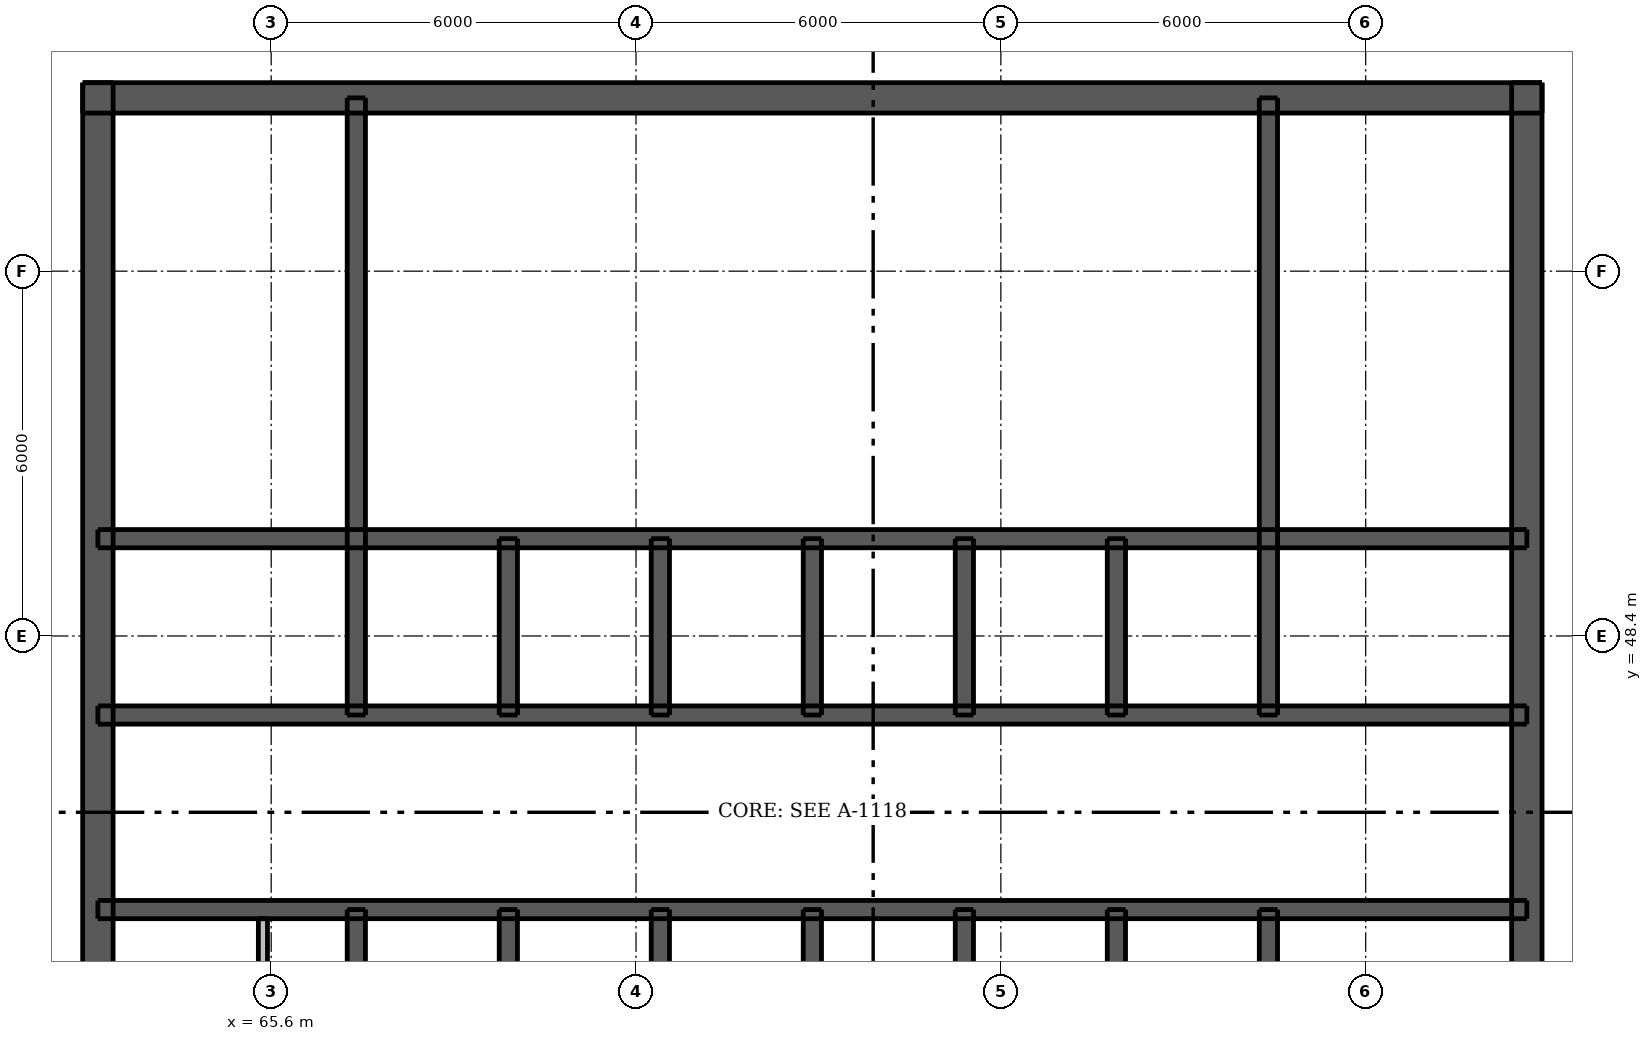
"""IFC4 building model, lengths in metres.
Left out: names, types, materials, properties, quantities, classifications, styles, units other than length and angle.
Written with IfcOpenShell. Run it as: python <this file> out.ifc"""

import sys

from ifc_helpers import new_model, si_unit, direction, frame, frame_2d, origin, place, context, subcontext, project, spatial, rectangle, extrude, element, fill, save


model = new_model("IFC4")
c1 = context("Model", 3, precision=1e-05, world=origin(), true_north=direction((0.0, 1.0)))
c2 = subcontext(c1, "Body", "Model", "MODEL_VIEW")
j1 = project(units=[si_unit("LENGTHUNIT", "METRE"), si_unit("PLANEANGLEUNIT", "RADIAN")], contexts=[c1])
p1 = place(None, origin())
s1 = spatial("IfcSite", under=j1, at=p1, CompositionType="ELEMENT")
p2 = place(p1, origin())
s2 = spatial("IfcBuilding", under=s1, at=p2, CompositionType="ELEMENT")
p3 = place(p2, frame((0.0, 0.0, 262.0)))
s3 = spatial("IfcBuildingStorey", under=s2, at=p3, CompositionType="ELEMENT", Elevation=262.0)
p4 = place(p3, frame((62.5, 57.25, 0.0), z_axis=(0.0, 0.0, 1.0), x_axis=(1.0, 0.0, 0.0)))
e1 = element("IfcWall", 1, at=p4, inside=s3, PredefinedType="SHEAR", context=c2, shape_type="SweptSolid", body=[
    extrude(rectangle(XDim=24.0, YDim=0.5, at=frame_2d((12.0, 0.0))), origin(), (0.0, 0.0, 1.0), 3.05),
])
p5 = place(p4, frame((21.025, 0.0, 0.0)))
e2 = element("IfcOpeningElement", 2, at=p5, cuts=e1, PredefinedType="OPENING", context=c2, shape_type="SweptSolid", body=[
    extrude(rectangle(XDim=1.1, YDim=2.1, at=frame_2d((0.55, 1.05))), frame((0.0, 0.26, 0.0), z_axis=(0.0, -1.0, 0.0), x_axis=(1.0, 0.0, 0.0)), (0.0, 0.0, 1.0), 0.52),
])
p6 = place(p4, frame((1.875, 0.0, 0.0)))
e3 = element("IfcOpeningElement", 3, at=p6, cuts=e1, PredefinedType="OPENING", context=c2, shape_type="SweptSolid", body=[
    extrude(rectangle(XDim=1.1, YDim=2.1, at=frame_2d((0.55, 1.05))), frame((0.0, 0.26, 0.0), z_axis=(0.0, -1.0, 0.0), x_axis=(1.0, 0.0, 0.0)), (0.0, 0.0, 1.0), 0.52),
])
p7 = place(p4, frame((11.55, 0.0, 0.0)))
e4 = element("IfcOpeningElement", 4, at=p7, cuts=e1, PredefinedType="OPENING", context=c2, shape_type="SweptSolid", body=[
    extrude(rectangle(XDim=0.9, YDim=2.1, at=frame_2d((0.45, 1.05))), frame((0.0, 0.26, 0.0), z_axis=(0.0, -1.0, 0.0), x_axis=(1.0, 0.0, 0.0)), (0.0, 0.0, 1.0), 0.52),
])
p8 = place(p3, frame((62.75, 33.5, 0.0), z_axis=(0.0, 0.0, 1.0), x_axis=(0.0, 1.0, 0.0)))
e5 = element("IfcWall", 5, at=p8, inside=s3, PredefinedType="SHEAR", context=c2, shape_type="SweptSolid", body=[
    extrude(rectangle(XDim=24.0, YDim=0.5, at=frame_2d((12.0, 0.0))), origin(), (0.0, 0.0, 1.0), 3.05),
])
p9 = place(p8, frame((11.2, 0.0, 0.0)))
e6 = element("IfcOpeningElement", 6, at=p9, cuts=e5, PredefinedType="OPENING", context=c2, shape_type="SweptSolid", body=[
    extrude(rectangle(XDim=1.6, YDim=2.1, at=frame_2d((0.8, 1.05))), frame((0.0, 0.26, 0.0), z_axis=(0.0, -1.0, 0.0), x_axis=(1.0, 0.0, 0.0)), (0.0, 0.0, 1.0), 0.52),
])
p10 = place(p3, frame((86.25, 33.5, 0.0), z_axis=(0.0, 0.0, 1.0), x_axis=(0.0, 1.0, 0.0)))
e7 = element("IfcWall", 7, at=p10, inside=s3, PredefinedType="SHEAR", context=c2, shape_type="SweptSolid", body=[
    extrude(rectangle(XDim=24.0, YDim=0.5, at=frame_2d((12.0, 0.0))), origin(), (0.0, 0.0, 1.0), 3.05),
])
p11 = place(p10, frame((11.2, 0.0, 0.0)))
e8 = element("IfcOpeningElement", 8, at=p11, cuts=e7, PredefinedType="OPENING", context=c2, shape_type="SweptSolid", body=[
    extrude(rectangle(XDim=1.6, YDim=2.1, at=frame_2d((0.8, 1.05))), frame((0.0, 0.26, 0.0), z_axis=(0.0, -1.0, 0.0), x_axis=(1.0, 0.0, 0.0)), (0.0, 0.0, 1.0), 0.52),
])
p12 = place(p3, frame((62.75, 43.9, 0.0), z_axis=(0.0, 0.0, 1.0), x_axis=(1.0, 0.0, 0.0)))
e9 = element("IfcWall", 9, at=p12, inside=s3, PredefinedType="SHEAR", context=c2, shape_type="SweptSolid", body=[
    extrude(rectangle(XDim=23.5, YDim=0.3, at=frame_2d((11.75, 0.0))), origin(), (0.0, 0.0, 1.0), 3.05),
])
p13 = place(p12, frame((1.032, 0.0, 0.0)))
e10 = element("IfcOpeningElement", 10, at=p13, cuts=e9, PredefinedType="OPENING", context=c2, shape_type="SweptSolid", body=[
    extrude(rectangle(XDim=0.9, YDim=2.1, at=frame_2d((0.45, 1.05))), frame((0.0, 0.16, 0.0), z_axis=(0.0, -1.0, 0.0), x_axis=(1.0, 0.0, 0.0)), (0.0, 0.0, 1.0), 0.32),
])
p14 = place(p12, frame((3.007, 0.0, 0.0)))
e11 = element("IfcOpeningElement", 11, at=p14, cuts=e9, PredefinedType="OPENING", context=c2, shape_type="SweptSolid", body=[
    extrude(rectangle(XDim=0.8, YDim=2.1, at=frame_2d((0.4, 1.05))), frame((0.0, 0.16, 0.0), z_axis=(0.0, -1.0, 0.0), x_axis=(1.0, 0.0, 0.0)), (0.0, 0.0, 1.0), 0.32),
])
p15 = place(p12, frame((20.875, 0.0, 0.0)))
e12 = element("IfcOpeningElement", 12, at=p15, cuts=e9, PredefinedType="OPENING", context=c2, shape_type="SweptSolid", body=[
    extrude(rectangle(XDim=0.9, YDim=2.1, at=frame_2d((0.45, 1.05))), frame((0.0, 0.16, 0.0), z_axis=(0.0, -1.0, 0.0), x_axis=(1.0, 0.0, 0.0)), (0.0, 0.0, 1.0), 0.32),
])
p16 = place(p12, frame((5.05, 0.0, 0.0)))
e13 = element("IfcOpeningElement", 13, at=p16, cuts=e9, PredefinedType="OPENING", context=c2, shape_type="SweptSolid", body=[
    extrude(rectangle(XDim=0.9, YDim=2.1, at=frame_2d((0.45, 1.05))), frame((0.0, 0.16, 0.0), z_axis=(0.0, -1.0, 0.0), x_axis=(1.0, 0.0, 0.0)), (0.0, 0.0, 1.0), 0.32),
])
p17 = place(p12, frame((10.05, 0.0, 0.0)))
e14 = element("IfcOpeningElement", 14, at=p17, cuts=e9, PredefinedType="OPENING", context=c2, shape_type="SweptSolid", body=[
    extrude(rectangle(XDim=0.9, YDim=2.1, at=frame_2d((0.45, 1.05))), frame((0.0, 0.16, 0.0), z_axis=(0.0, -1.0, 0.0), x_axis=(1.0, 0.0, 0.0)), (0.0, 0.0, 1.0), 0.32),
])
p18 = place(p12, frame((12.55, 0.0, 0.0)))
e15 = element("IfcOpeningElement", 15, at=p18, cuts=e9, PredefinedType="OPENING", context=c2, shape_type="SweptSolid", body=[
    extrude(rectangle(XDim=0.9, YDim=2.1, at=frame_2d((0.45, 1.05))), frame((0.0, 0.16, 0.0), z_axis=(0.0, -1.0, 0.0), x_axis=(1.0, 0.0, 0.0)), (0.0, 0.0, 1.0), 0.32),
])
p19 = place(p12, frame((17.55, 0.0, 0.0)))
e16 = element("IfcOpeningElement", 16, at=p19, cuts=e9, PredefinedType="OPENING", context=c2, shape_type="SweptSolid", body=[
    extrude(rectangle(XDim=0.9, YDim=2.1, at=frame_2d((0.45, 1.05))), frame((0.0, 0.16, 0.0), z_axis=(0.0, -1.0, 0.0), x_axis=(1.0, 0.0, 0.0)), (0.0, 0.0, 1.0), 0.32),
])
p20 = place(p3, frame((62.75, 47.1, 0.0), z_axis=(0.0, 0.0, 1.0), x_axis=(1.0, 0.0, 0.0)))
e17 = element("IfcWall", 17, at=p20, inside=s3, PredefinedType="SHEAR", context=c2, shape_type="SweptSolid", body=[
    extrude(rectangle(XDim=23.5, YDim=0.3, at=frame_2d((11.75, 0.0))), origin(), (0.0, 0.0, 1.0), 3.05),
])
p21 = place(p20, frame((1.725, 0.0, 0.0)))
e18 = element("IfcOpeningElement", 18, at=p21, cuts=e17, PredefinedType="OPENING", context=c2, shape_type="SweptSolid", body=[
    extrude(rectangle(XDim=0.9, YDim=2.1, at=frame_2d((0.45, 1.05))), frame((0.0, 0.16, 0.0), z_axis=(0.0, -1.0, 0.0), x_axis=(1.0, 0.0, 0.0)), (0.0, 0.0, 1.0), 0.32),
])
p22 = place(p20, frame((20.875, 0.0, 0.0)))
e19 = element("IfcOpeningElement", 19, at=p22, cuts=e17, PredefinedType="OPENING", context=c2, shape_type="SweptSolid", body=[
    extrude(rectangle(XDim=0.9, YDim=2.1, at=frame_2d((0.45, 1.05))), frame((0.0, 0.16, 0.0), z_axis=(0.0, -1.0, 0.0), x_axis=(1.0, 0.0, 0.0)), (0.0, 0.0, 1.0), 0.32),
])
p23 = place(p20, frame((4.95, 0.0, 0.0)))
e20 = element("IfcOpeningElement", 20, at=p23, cuts=e17, PredefinedType="OPENING", context=c2, shape_type="SweptSolid", body=[
    extrude(rectangle(XDim=1.1, YDim=2.1, at=frame_2d((0.55, 1.05))), frame((0.0, 0.16, 0.0), z_axis=(0.0, -1.0, 0.0), x_axis=(1.0, 0.0, 0.0)), (0.0, 0.0, 1.0), 0.32),
])
p24 = place(p20, frame((7.45, 0.0, 0.0)))
e21 = element("IfcOpeningElement", 21, at=p24, cuts=e17, PredefinedType="OPENING", context=c2, shape_type="SweptSolid", body=[
    extrude(rectangle(XDim=1.1, YDim=2.1, at=frame_2d((0.55, 1.05))), frame((0.0, 0.16, 0.0), z_axis=(0.0, -1.0, 0.0), x_axis=(1.0, 0.0, 0.0)), (0.0, 0.0, 1.0), 0.32),
])
p25 = place(p20, frame((9.95, 0.0, 0.0)))
e22 = element("IfcOpeningElement", 22, at=p25, cuts=e17, PredefinedType="OPENING", context=c2, shape_type="SweptSolid", body=[
    extrude(rectangle(XDim=1.1, YDim=2.1, at=frame_2d((0.55, 1.05))), frame((0.0, 0.16, 0.0), z_axis=(0.0, -1.0, 0.0), x_axis=(1.0, 0.0, 0.0)), (0.0, 0.0, 1.0), 0.32),
])
p26 = place(p20, frame((12.45, 0.0, 0.0)))
e23 = element("IfcOpeningElement", 23, at=p26, cuts=e17, PredefinedType="OPENING", context=c2, shape_type="SweptSolid", body=[
    extrude(rectangle(XDim=1.1, YDim=2.1, at=frame_2d((0.55, 1.05))), frame((0.0, 0.16, 0.0), z_axis=(0.0, -1.0, 0.0), x_axis=(1.0, 0.0, 0.0)), (0.0, 0.0, 1.0), 0.32),
])
p27 = place(p20, frame((14.95, 0.0, 0.0)))
e24 = element("IfcOpeningElement", 24, at=p27, cuts=e17, PredefinedType="OPENING", context=c2, shape_type="SweptSolid", body=[
    extrude(rectangle(XDim=1.1, YDim=2.1, at=frame_2d((0.55, 1.05))), frame((0.0, 0.16, 0.0), z_axis=(0.0, -1.0, 0.0), x_axis=(1.0, 0.0, 0.0)), (0.0, 0.0, 1.0), 0.32),
])
p28 = place(p20, frame((17.45, 0.0, 0.0)))
e25 = element("IfcOpeningElement", 25, at=p28, cuts=e17, PredefinedType="OPENING", context=c2, shape_type="SweptSolid", body=[
    extrude(rectangle(XDim=1.1, YDim=2.1, at=frame_2d((0.55, 1.05))), frame((0.0, 0.16, 0.0), z_axis=(0.0, -1.0, 0.0), x_axis=(1.0, 0.0, 0.0)), (0.0, 0.0, 1.0), 0.32),
])
p29 = place(p3, frame((62.75, 50.0, 0.0), z_axis=(0.0, 0.0, 1.0), x_axis=(1.0, 0.0, 0.0)))
e26 = element("IfcWall", 26, at=p29, inside=s3, PredefinedType="SHEAR", context=c2, shape_type="SweptSolid", body=[
    extrude(rectangle(XDim=23.5, YDim=0.3, at=frame_2d((11.75, 0.0))), origin(), (0.0, 0.0, 1.0), 3.05),
])
p30 = place(p3, frame((67.0, 33.75, 0.0), z_axis=(0.0, 0.0, 1.0), x_axis=(0.0, 1.0, 0.0)))
e27 = element("IfcWall", 27, at=p30, inside=s3, PredefinedType="SHEAR", context=c2, shape_type="SweptSolid", body=[
    extrude(rectangle(XDim=10.15, YDim=0.3, at=frame_2d((5.075, 0.0))), origin(), (0.0, 0.0, 1.0), 3.05),
])
p31 = place(p30, frame((0.45, 0.0, 0.0)))
e28 = element("IfcOpeningElement", 28, at=p31, cuts=e27, PredefinedType="OPENING", context=c2, shape_type="SweptSolid", body=[
    extrude(rectangle(XDim=1.1, YDim=2.1, at=frame_2d((0.55, 1.05))), frame((0.0, 0.16, 0.0), z_axis=(0.0, -1.0, 0.0), x_axis=(1.0, 0.0, 0.0)), (0.0, 0.0, 1.0), 0.32),
])
for number, where, z_axis, x_axis in (
    (29, (67.0, 47.1, 0.0), (0.0, 0.0, 1.0), (0.0, 1.0, 0.0)),
    (30, (82.0, 33.75, 0.0), (0.0, 0.0, 1.0), (0.0, 1.0, 0.0)),
    (31, (82.0, 47.1, 0.0), (0.0, 0.0, 1.0), (0.0, 1.0, 0.0)),
):
    element("IfcWall", number, at=place(p3, frame(where, z_axis=z_axis, x_axis=x_axis)), inside=s3, PredefinedType="SHEAR", context=c2, shape_type="SweptSolid", body=[
        extrude(rectangle(XDim=10.15, YDim=0.3, at=frame_2d((5.075, 0.0))), origin(), (0.0, 0.0, 1.0), 3.05),
    ])
for number, where, z_axis, x_axis in (
    (32, (69.5, 41.0, 0.0), (0.0, 0.0, 1.0), (0.0, 1.0, 0.0)),
    (33, (69.5, 47.1, 0.0), (0.0, 0.0, 1.0), (0.0, 1.0, 0.0)),
    (34, (72.0, 41.0, 0.0), (0.0, 0.0, 1.0), (0.0, 1.0, 0.0)),
    (35, (72.0, 47.1, 0.0), (0.0, 0.0, 1.0), (0.0, 1.0, 0.0)),
    (36, (74.5, 41.0, 0.0), (0.0, 0.0, 1.0), (0.0, 1.0, 0.0)),
    (37, (74.5, 47.1, 0.0), (0.0, 0.0, 1.0), (0.0, 1.0, 0.0)),
    (38, (77.0, 41.0, 0.0), (0.0, 0.0, 1.0), (0.0, 1.0, 0.0)),
    (39, (77.0, 47.1, 0.0), (0.0, 0.0, 1.0), (0.0, 1.0, 0.0)),
    (40, (79.5, 41.0, 0.0), (0.0, 0.0, 1.0), (0.0, 1.0, 0.0)),
    (41, (79.5, 47.1, 0.0), (0.0, 0.0, 1.0), (0.0, 1.0, 0.0)),
):
    element("IfcWall", number, at=place(p3, frame(where, z_axis=z_axis, x_axis=x_axis)), inside=s3, PredefinedType="SHEAR", context=c2, shape_type="SweptSolid", body=[
        extrude(rectangle(XDim=2.9, YDim=0.3, at=frame_2d((1.45, 0.0))), origin(), (0.0, 0.0, 1.0), 3.05),
    ])
p32 = place(p3, frame((65.464, 41.15, 0.0), z_axis=(0.0, 0.0, 1.0), x_axis=(0.0, 1.0, 0.0)))
e42 = element("IfcWall", 42, at=p32, inside=s3, PredefinedType="PLUMBINGWALL", context=c2, shape_type="SweptSolid", body=[
    extrude(rectangle(XDim=2.6, YDim=0.15, at=frame_2d((1.3, 0.0))), origin(), (0.0, 0.0, 1.0), 3.05),
])
p33 = place(p5, origin())
e43 = element("IfcDoor", 43, at=p33, inside=s3, OperationType="SINGLE_SWING_RIGHT", PredefinedType="DOOR", context=c2, shape_type="SweptSolid", body=[
    extrude(rectangle(XDim=1.1, YDim=2.1, at=frame_2d((0.55, 1.05))), frame((0.0, -0.188, 0.0), z_axis=(0.0, -1.0, 0.0), x_axis=(1.0, 0.0, 0.0)), (0.0, 0.0, 1.0), 0.05),
])
fill(e2, e43)
p34 = place(p6, origin())
e44 = element("IfcDoor", 44, at=p34, inside=s3, OperationType="SINGLE_SWING_LEFT", PredefinedType="DOOR", context=c2, shape_type="SweptSolid", body=[
    extrude(rectangle(XDim=1.1, YDim=2.1, at=frame_2d((0.55, 1.05))), frame((0.0, -0.188, 0.0), z_axis=(0.0, -1.0, 0.0), x_axis=(1.0, 0.0, 0.0)), (0.0, 0.0, 1.0), 0.05),
])
fill(e3, e44)
p35 = place(p9, origin())
e45 = element("IfcDoor", 45, at=p35, inside=s3, OperationType="DOUBLE_DOOR_SINGLE_SWING", PredefinedType="DOOR", context=c2, shape_type="SweptSolid", body=[
    extrude(rectangle(XDim=1.6, YDim=2.1, at=frame_2d((0.8, 1.05))), frame((0.0, -0.188, 0.0), z_axis=(0.0, -1.0, 0.0), x_axis=(1.0, 0.0, 0.0)), (0.0, 0.0, 1.0), 0.05),
])
fill(e6, e45)
p36 = place(p11, origin())
e46 = element("IfcDoor", 46, at=p36, inside=s3, OperationType="DOUBLE_DOOR_SINGLE_SWING", PredefinedType="DOOR", context=c2, shape_type="SweptSolid", body=[
    extrude(rectangle(XDim=1.6, YDim=2.1, at=frame_2d((0.8, 1.05))), frame((0.0, 0.237, 0.0), z_axis=(0.0, -1.0, 0.0), x_axis=(1.0, 0.0, 0.0)), (0.0, 0.0, 1.0), 0.05),
])
fill(e8, e46)
p37 = place(p13, origin())
e47 = element("IfcDoor", 47, at=p37, inside=s3, OperationType="SINGLE_SWING_LEFT", PredefinedType="DOOR", context=c2, shape_type="SweptSolid", body=[
    extrude(rectangle(XDim=0.9, YDim=2.1, at=frame_2d((0.45, 1.05))), frame((0.0, -0.087, 0.0), z_axis=(0.0, -1.0, 0.0), x_axis=(1.0, 0.0, 0.0)), (0.0, 0.0, 1.0), 0.05),
])
fill(e10, e47)
p38 = place(p14, origin())
e48 = element("IfcDoor", 48, at=p38, inside=s3, OperationType="SINGLE_SWING_RIGHT", PredefinedType="DOOR", context=c2, shape_type="SweptSolid", body=[
    extrude(rectangle(XDim=0.8, YDim=2.1, at=frame_2d((0.4, 1.05))), frame((0.0, -0.087, 0.0), z_axis=(0.0, -1.0, 0.0), x_axis=(1.0, 0.0, 0.0)), (0.0, 0.0, 1.0), 0.05),
])
fill(e11, e48)
p39 = place(p15, origin())
e49 = element("IfcDoor", 49, at=p39, inside=s3, OperationType="SINGLE_SWING_LEFT", PredefinedType="DOOR", context=c2, shape_type="SweptSolid", body=[
    extrude(rectangle(XDim=0.9, YDim=2.1, at=frame_2d((0.45, 1.05))), frame((0.0, -0.087, 0.0), z_axis=(0.0, -1.0, 0.0), x_axis=(1.0, 0.0, 0.0)), (0.0, 0.0, 1.0), 0.05),
])
fill(e12, e49)
p40 = place(p21, origin())
e50 = element("IfcDoor", 50, at=p40, inside=s3, OperationType="SINGLE_SWING_LEFT", PredefinedType="DOOR", context=c2, shape_type="SweptSolid", body=[
    extrude(rectangle(XDim=0.9, YDim=2.1, at=frame_2d((0.45, 1.05))), frame((0.0, 0.138, 0.0), z_axis=(0.0, -1.0, 0.0), x_axis=(1.0, 0.0, 0.0)), (0.0, 0.0, 1.0), 0.05),
])
fill(e18, e50)
p41 = place(p22, origin())
e51 = element("IfcDoor", 51, at=p41, inside=s3, OperationType="SINGLE_SWING_LEFT", PredefinedType="DOOR", context=c2, shape_type="SweptSolid", body=[
    extrude(rectangle(XDim=0.9, YDim=2.1, at=frame_2d((0.45, 1.05))), frame((0.0, 0.138, 0.0), z_axis=(0.0, -1.0, 0.0), x_axis=(1.0, 0.0, 0.0)), (0.0, 0.0, 1.0), 0.05),
])
fill(e19, e51)
p42 = place(p7, origin())
e52 = element("IfcDoor", 52, at=p42, inside=s3, OperationType="SINGLE_SWING_RIGHT", PredefinedType="DOOR", context=c2, shape_type="SweptSolid", body=[
    extrude(rectangle(XDim=0.9, YDim=2.1, at=frame_2d((0.45, 1.05))), frame((0.0, -0.188, 0.0), z_axis=(0.0, -1.0, 0.0), x_axis=(1.0, 0.0, 0.0)), (0.0, 0.0, 1.0), 0.05),
])
fill(e4, e52)
p43 = place(p16, origin())
e53 = element("IfcDoor", 53, at=p43, inside=s3, OperationType="SINGLE_SWING_RIGHT", PredefinedType="DOOR", context=c2, shape_type="SweptSolid", body=[
    extrude(rectangle(XDim=0.9, YDim=2.1, at=frame_2d((0.45, 1.05))), frame((0.0, -0.087, 0.0), z_axis=(0.0, -1.0, 0.0), x_axis=(1.0, 0.0, 0.0)), (0.0, 0.0, 1.0), 0.05),
])
fill(e13, e53)
p44 = place(p17, origin())
e54 = element("IfcDoor", 54, at=p44, inside=s3, OperationType="SINGLE_SWING_RIGHT", PredefinedType="DOOR", context=c2, shape_type="SweptSolid", body=[
    extrude(rectangle(XDim=0.9, YDim=2.1, at=frame_2d((0.45, 1.05))), frame((0.0, -0.087, 0.0), z_axis=(0.0, -1.0, 0.0), x_axis=(1.0, 0.0, 0.0)), (0.0, 0.0, 1.0), 0.05),
])
fill(e14, e54)
p45 = place(p18, origin())
e55 = element("IfcDoor", 55, at=p45, inside=s3, OperationType="SINGLE_SWING_LEFT", PredefinedType="DOOR", context=c2, shape_type="SweptSolid", body=[
    extrude(rectangle(XDim=0.9, YDim=2.1, at=frame_2d((0.45, 1.05))), frame((0.0, -0.087, 0.0), z_axis=(0.0, -1.0, 0.0), x_axis=(1.0, 0.0, 0.0)), (0.0, 0.0, 1.0), 0.05),
])
fill(e15, e55)
p46 = place(p19, origin())
e56 = element("IfcDoor", 56, at=p46, inside=s3, OperationType="SINGLE_SWING_LEFT", PredefinedType="DOOR", context=c2, shape_type="SweptSolid", body=[
    extrude(rectangle(XDim=0.9, YDim=2.1, at=frame_2d((0.45, 1.05))), frame((0.0, -0.087, 0.0), z_axis=(0.0, -1.0, 0.0), x_axis=(1.0, 0.0, 0.0)), (0.0, 0.0, 1.0), 0.05),
])
fill(e16, e56)
p47 = place(p23, origin())
e57 = element("IfcDoor", 57, at=p47, inside=s3, OperationType="DOUBLE_DOOR_SLIDING", PredefinedType="DOOR", context=c2, shape_type="SweptSolid", body=[
    extrude(rectangle(XDim=1.1, YDim=2.1, at=frame_2d((0.55, 1.05))), frame((0.0, 0.025, 0.0), z_axis=(0.0, -1.0, 0.0), x_axis=(1.0, 0.0, 0.0)), (0.0, 0.0, 1.0), 0.05),
])
fill(e20, e57)
p48 = place(p24, origin())
e58 = element("IfcDoor", 58, at=p48, inside=s3, OperationType="DOUBLE_DOOR_SLIDING", PredefinedType="DOOR", context=c2, shape_type="SweptSolid", body=[
    extrude(rectangle(XDim=1.1, YDim=2.1, at=frame_2d((0.55, 1.05))), frame((0.0, 0.025, 0.0), z_axis=(0.0, -1.0, 0.0), x_axis=(1.0, 0.0, 0.0)), (0.0, 0.0, 1.0), 0.05),
])
fill(e21, e58)
p49 = place(p25, origin())
e59 = element("IfcDoor", 59, at=p49, inside=s3, OperationType="DOUBLE_DOOR_SLIDING", PredefinedType="DOOR", context=c2, shape_type="SweptSolid", body=[
    extrude(rectangle(XDim=1.1, YDim=2.1, at=frame_2d((0.55, 1.05))), frame((0.0, 0.025, 0.0), z_axis=(0.0, -1.0, 0.0), x_axis=(1.0, 0.0, 0.0)), (0.0, 0.0, 1.0), 0.05),
])
fill(e22, e59)
p50 = place(p26, origin())
e60 = element("IfcDoor", 60, at=p50, inside=s3, OperationType="DOUBLE_DOOR_SLIDING", PredefinedType="DOOR", context=c2, shape_type="SweptSolid", body=[
    extrude(rectangle(XDim=1.1, YDim=2.1, at=frame_2d((0.55, 1.05))), frame((0.0, 0.025, 0.0), z_axis=(0.0, -1.0, 0.0), x_axis=(1.0, 0.0, 0.0)), (0.0, 0.0, 1.0), 0.05),
])
fill(e23, e60)
p51 = place(p27, origin())
e61 = element("IfcDoor", 61, at=p51, inside=s3, OperationType="DOUBLE_DOOR_SLIDING", PredefinedType="DOOR", context=c2, shape_type="SweptSolid", body=[
    extrude(rectangle(XDim=1.1, YDim=2.1, at=frame_2d((0.55, 1.05))), frame((0.0, 0.025, 0.0), z_axis=(0.0, -1.0, 0.0), x_axis=(1.0, 0.0, 0.0)), (0.0, 0.0, 1.0), 0.05),
])
fill(e24, e61)
p52 = place(p28, origin())
e62 = element("IfcDoor", 62, at=p52, inside=s3, OperationType="DOUBLE_DOOR_SLIDING", PredefinedType="DOOR", context=c2, shape_type="SweptSolid", body=[
    extrude(rectangle(XDim=1.1, YDim=2.1, at=frame_2d((0.55, 1.05))), frame((0.0, 0.025, 0.0), z_axis=(0.0, -1.0, 0.0), x_axis=(1.0, 0.0, 0.0)), (0.0, 0.0, 1.0), 0.05),
])
fill(e25, e62)
save(model, sys.argv[1])
